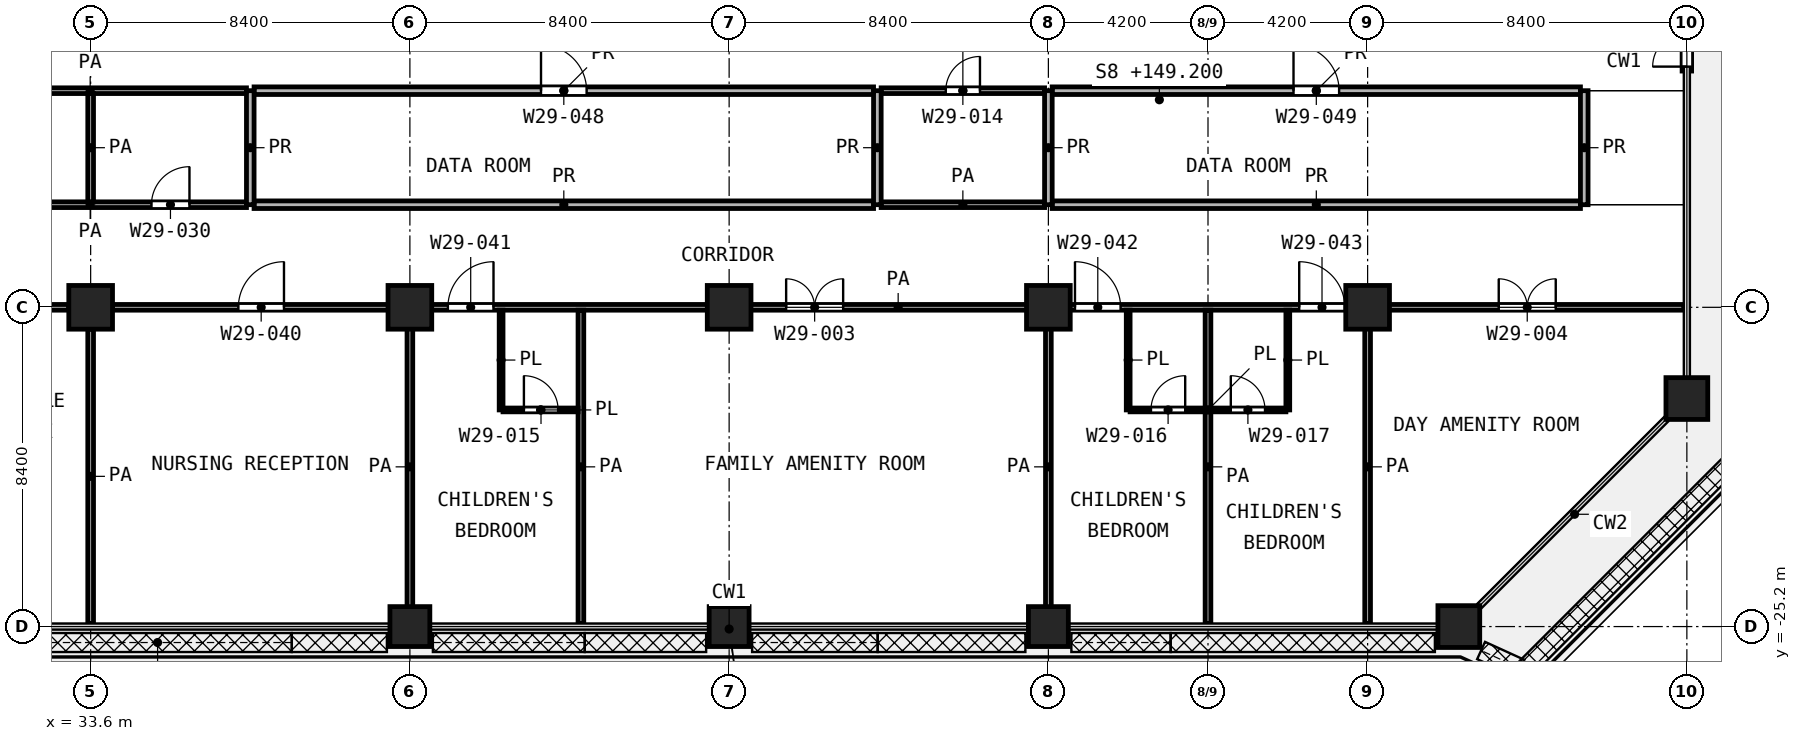
"""IFC4 building model, lengths in metres.
Left out: names, types, materials, properties, quantities, classifications, styles, units other than length and angle.
Written with IfcOpenShell. Run it as: python <this file> out.ifc"""

import sys

from ifc_helpers import new_model, si_unit, direction, frame, frame_2d, origin, origin_2d, place, context, subcontext, project, spatial, rectangle, extrude, element, fill, save


model = new_model("IFC4")
c1 = context("Model", 3, precision=1e-05, world=origin(), true_north=direction((0.0, 1.0)))
c2 = subcontext(c1, "Body", "Model", "MODEL_VIEW")
j1 = project(units=[si_unit("LENGTHUNIT", "METRE"), si_unit("PLANEANGLEUNIT", "RADIAN")], contexts=[c1])
p1 = place(None, origin())
s1 = spatial("IfcSite", under=j1, at=p1, CompositionType="ELEMENT")
p2 = place(p1, origin())
s2 = spatial("IfcBuilding", under=s1, at=p2, CompositionType="ELEMENT")
p3 = place(p2, frame((0.0, 0.0, 149.2)))
s3 = spatial("IfcBuildingStorey", under=s2, at=p3, CompositionType="ELEMENT", Elevation=149.2)
for number, where, z_axis, x_axis in (
    (1, (33.6, -16.8, 0.0), (0.0, 0.0, 1.0), (1.0, 0.0, 0.0)),
    (2, (42.0, -16.8, 0.0), (0.0, 0.0, 1.0), (1.0, 0.0, 0.0)),
    (3, (50.4, -16.8, 0.0), (0.0, 0.0, 1.0), (1.0, 0.0, 0.0)),
    (4, (58.8, -16.8, 0.0), (0.0, 0.0, 1.0), (1.0, 0.0, 0.0)),
    (5, (67.2, -16.8, 0.0), (0.0, 0.0, 1.0), (1.0, 0.0, 0.0)),
):
    element("IfcColumn", number, at=place(p3, frame(where, z_axis=z_axis, x_axis=x_axis)), inside=s3, PredefinedType="COLUMN", context=c2, shape_type="SweptSolid", body=[
        extrude(rectangle(XDim=1.15, YDim=1.15, at=origin_2d()), origin(), (0.0, 0.0, 1.0), 4.2),
    ])
p4 = place(p3, frame((75.6, -19.2, 0.0), z_axis=(0.0, 0.0, 1.0), x_axis=(1.0, 0.0, 0.0)))
e6 = element("IfcColumn", 6, at=p4, inside=s3, PredefinedType="COLUMN", context=c2, shape_type="SweptSolid", body=[
    extrude(rectangle(XDim=1.1, YDim=1.1, at=origin_2d()), origin(), (0.0, 0.0, 1.0), 4.2),
])
for number, where, z_axis, x_axis in (
    (7, (42.0, -25.2, 0.0), (0.0, 0.0, 1.0), (1.0, 0.0, 0.0)),
    (8, (50.4, -25.2, 0.0), (0.0, 0.0, 1.0), (1.0, 0.0, 0.0)),
    (9, (58.8, -25.2, 0.0), (0.0, 0.0, 1.0), (1.0, 0.0, 0.0)),
):
    element("IfcColumn", number, at=place(p3, frame(where, z_axis=z_axis, x_axis=x_axis)), inside=s3, PredefinedType="COLUMN", context=c2, shape_type="SweptSolid", body=[
        extrude(rectangle(XDim=1.05, YDim=1.05, at=origin_2d()), origin(), (0.0, 0.0, 1.0), 4.2),
    ])
p5 = place(p3, frame((69.6, -25.2, 0.0), z_axis=(0.0, 0.0, 1.0), x_axis=(1.0, 0.0, 0.0)))
e10 = element("IfcColumn", 10, at=p5, inside=s3, PredefinedType="COLUMN", context=c2, shape_type="SweptSolid", body=[
    extrude(rectangle(XDim=1.1, YDim=1.1, at=origin_2d()), origin(), (0.0, 0.0, 1.0), 4.2),
])
p6 = place(p3, frame((75.6, -10.583, 0.0), z_axis=(0.0, 0.0, 1.0), x_axis=(0.0, 1.0, 0.0)))
e11 = element("IfcWall", 11, at=p6, inside=s3, PredefinedType="SOLIDWALL", context=c2, shape_type="SweptSolid", body=[
    extrude(rectangle(XDim=4.033, YDim=0.25, at=frame_2d((2.017, 0.0))), origin(), (0.0, 0.0, 1.0), 3.58),
])
p7 = place(p6, frame((0.117, 0.0, 0.0)))
e12 = element("IfcOpeningElement", 12, at=p7, cuts=e11, PredefinedType="OPENING", context=c2, shape_type="SweptSolid", body=[
    extrude(rectangle(XDim=1.8, YDim=2.1, at=frame_2d((0.9, 1.05))), frame((0.0, 0.135, 0.0), z_axis=(0.0, -1.0, 0.0), x_axis=(1.0, 0.0, 0.0)), (0.0, 0.0, 1.0), 0.27),
])
p8 = place(p3, frame((44.45, -19.5, 0.0), z_axis=(0.0, 0.0, 1.0), x_axis=(1.0, 0.0, 0.0)))
e13 = element("IfcWall", 13, at=p8, inside=s3, PredefinedType="PARTITIONING", context=c2, shape_type="SweptSolid", body=[
    extrude(rectangle(XDim=1.975, YDim=0.1, at=frame_2d((0.988, 0.0))), origin(), (0.0, 0.0, 1.0), 3.7),
])
p9 = place(p8, frame((0.55, 0.0, 0.0)))
e14 = element("IfcOpeningElement", 14, at=p9, cuts=e13, PredefinedType="OPENING", context=c2, shape_type="SweptSolid", body=[
    extrude(rectangle(XDim=0.9, YDim=2.1, at=frame_2d((0.45, 1.05))), frame((0.0, 0.06, 0.0), z_axis=(0.0, -1.0, 0.0), x_axis=(1.0, 0.0, 0.0)), (0.0, 0.0, 1.0), 0.12),
])
p10 = place(p3, frame((60.95, -19.5, 0.0), z_axis=(0.0, 0.0, 1.0), x_axis=(1.0, 0.0, 0.0)))
e15 = element("IfcWall", 15, at=p10, inside=s3, PredefinedType="PARTITIONING", context=c2, shape_type="SweptSolid", body=[
    extrude(rectangle(XDim=4.1, YDim=0.1, at=frame_2d((2.05, 0.0))), origin(), (0.0, 0.0, 1.0), 3.7),
])
p11 = place(p10, frame((0.55, 0.0, 0.0)))
e16 = element("IfcOpeningElement", 16, at=p11, cuts=e15, PredefinedType="OPENING", context=c2, shape_type="SweptSolid", body=[
    extrude(rectangle(XDim=0.9, YDim=2.1, at=frame_2d((0.45, 1.05))), frame((0.0, 0.06, 0.0), z_axis=(0.0, -1.0, 0.0), x_axis=(1.0, 0.0, 0.0)), (0.0, 0.0, 1.0), 0.12),
])
p12 = place(p10, frame((2.65, 0.0, 0.0)))
e17 = element("IfcOpeningElement", 17, at=p12, cuts=e15, PredefinedType="OPENING", context=c2, shape_type="SweptSolid", body=[
    extrude(rectangle(XDim=0.9, YDim=2.1, at=frame_2d((0.45, 1.05))), frame((0.0, 0.06, 0.0), z_axis=(0.0, -1.0, 0.0), x_axis=(1.0, 0.0, 0.0)), (0.0, 0.0, 1.0), 0.12),
])
for number, where, z_axis, x_axis in (
    (18, (44.4, -19.5, 0.0), (0.0, 0.0, 1.0), (0.0, 1.0, 0.0)),
    (19, (60.9, -19.5, 0.0), (0.0, 0.0, 1.0), (0.0, 1.0, 0.0)),
    (20, (65.1, -19.5, 0.0), (0.0, 0.0, 1.0), (0.0, 1.0, 0.0)),
):
    element("IfcWall", number, at=place(p3, frame(where, z_axis=z_axis, x_axis=x_axis)), inside=s3, PredefinedType="PARTITIONING", context=c2, shape_type="SweptSolid", body=[
        extrude(rectangle(XDim=2.625, YDim=0.1, at=frame_2d((1.312, 0.0))), origin(), (0.0, 0.0, 1.0), 3.7),
    ])
p13 = place(p3, frame((25.0, -16.8, 0.0), z_axis=(0.0, 0.0, 1.0), x_axis=(1.0, 0.0, 0.0)))
e21 = element("IfcWall", 21, at=p13, inside=s3, PredefinedType="PARTITIONING", context=c2, shape_type="SweptSolid", body=[
    extrude(rectangle(XDim=8.025, YDim=0.15, at=frame_2d((4.012, 0.0))), origin(), (0.0, 0.0, 1.0), 3.7),
])
p14 = place(p13, frame((1.55, 0.0, 0.0)))
e22 = element("IfcOpeningElement", 22, at=p14, cuts=e21, PredefinedType="OPENING", context=c2, shape_type="SweptSolid", body=[
    extrude(rectangle(XDim=1.5, YDim=2.1, at=frame_2d((0.75, 1.05))), frame((0.0, 0.085, 0.0), z_axis=(0.0, -1.0, 0.0), x_axis=(1.0, 0.0, 0.0)), (0.0, 0.0, 1.0), 0.17),
])
p15 = place(p13, frame((5.712, 0.0, 0.0)))
e23 = element("IfcOpeningElement", 23, at=p15, cuts=e21, PredefinedType="OPENING", context=c2, shape_type="SweptSolid", body=[
    extrude(rectangle(XDim=1.0, YDim=2.1, at=frame_2d((0.5, 1.05))), frame((0.0, 0.085, 0.0), z_axis=(0.0, -1.0, 0.0), x_axis=(1.0, 0.0, 0.0)), (0.0, 0.0, 1.0), 0.17),
])
p16 = place(p3, frame((34.175, -16.8, 0.0), z_axis=(0.0, 0.0, 1.0), x_axis=(1.0, 0.0, 0.0)))
e24 = element("IfcWall", 24, at=p16, inside=s3, PredefinedType="PARTITIONING", context=c2, shape_type="SweptSolid", body=[
    extrude(rectangle(XDim=41.345, YDim=0.15, at=frame_2d((20.672, 0.0))), origin(), (0.0, 0.0, 1.0), 3.7),
])
p17 = place(p16, frame((3.312, 0.0, 0.0)))
e25 = element("IfcOpeningElement", 25, at=p17, cuts=e24, PredefinedType="OPENING", context=c2, shape_type="SweptSolid", body=[
    extrude(rectangle(XDim=1.2, YDim=2.1, at=frame_2d((0.6, 1.05))), frame((0.0, 0.085, 0.0), z_axis=(0.0, -1.0, 0.0), x_axis=(1.0, 0.0, 0.0)), (0.0, 0.0, 1.0), 0.17),
])
p18 = place(p16, frame((8.825, 0.0, 0.0)))
e26 = element("IfcOpeningElement", 26, at=p18, cuts=e24, PredefinedType="OPENING", context=c2, shape_type="SweptSolid", body=[
    extrude(rectangle(XDim=1.2, YDim=2.1, at=frame_2d((0.6, 1.05))), frame((0.0, 0.085, 0.0), z_axis=(0.0, -1.0, 0.0), x_axis=(1.0, 0.0, 0.0)), (0.0, 0.0, 1.0), 0.17),
])
p19 = place(p16, frame((17.725, 0.0, 0.0)))
e27 = element("IfcOpeningElement", 27, at=p19, cuts=e24, PredefinedType="OPENING", context=c2, shape_type="SweptSolid", body=[
    extrude(rectangle(XDim=1.5, YDim=2.1, at=frame_2d((0.75, 1.05))), frame((0.0, 0.085, 0.0), z_axis=(0.0, -1.0, 0.0), x_axis=(1.0, 0.0, 0.0)), (0.0, 0.0, 1.0), 0.17),
])
p20 = place(p16, frame((25.325, 0.0, 0.0)))
e28 = element("IfcOpeningElement", 28, at=p20, cuts=e24, PredefinedType="OPENING", context=c2, shape_type="SweptSolid", body=[
    extrude(rectangle(XDim=1.2, YDim=2.1, at=frame_2d((0.6, 1.05))), frame((0.0, 0.085, 0.0), z_axis=(0.0, -1.0, 0.0), x_axis=(1.0, 0.0, 0.0)), (0.0, 0.0, 1.0), 0.17),
])
p21 = place(p16, frame((31.225, 0.0, 0.0)))
e29 = element("IfcOpeningElement", 29, at=p21, cuts=e24, PredefinedType="OPENING", context=c2, shape_type="SweptSolid", body=[
    extrude(rectangle(XDim=1.2, YDim=2.1, at=frame_2d((0.6, 1.05))), frame((0.0, 0.085, 0.0), z_axis=(0.0, -1.0, 0.0), x_axis=(1.0, 0.0, 0.0)), (0.0, 0.0, 1.0), 0.17),
])
p22 = place(p16, frame((36.475, 0.0, 0.0)))
e30 = element("IfcOpeningElement", 30, at=p22, cuts=e24, PredefinedType="OPENING", context=c2, shape_type="SweptSolid", body=[
    extrude(rectangle(XDim=1.5, YDim=2.1, at=frame_2d((0.75, 1.05))), frame((0.0, 0.085, 0.0), z_axis=(0.0, -1.0, 0.0), x_axis=(1.0, 0.0, 0.0)), (0.0, 0.0, 1.0), 0.17),
])
p23 = place(p3, frame((29.475, -14.1, 0.0), z_axis=(0.0, 0.0, 1.0), x_axis=(1.0, 0.0, 0.0)))
e31 = element("IfcWall", 31, at=p23, inside=s3, PredefinedType="PARTITIONING", context=c2, shape_type="SweptSolid", body=[
    extrude(rectangle(XDim=8.225, YDim=0.15, at=frame_2d((4.112, 0.0))), origin(), (0.0, 0.0, 1.0), 3.7),
])
p24 = place(p23, frame((5.725, 0.0, 0.0)))
e32 = element("IfcOpeningElement", 32, at=p24, cuts=e31, PredefinedType="OPENING", context=c2, shape_type="SweptSolid", body=[
    extrude(rectangle(XDim=1.0, YDim=2.1, at=frame_2d((0.5, 1.05))), frame((0.0, 0.085, 0.0), z_axis=(0.0, -1.0, 0.0), x_axis=(1.0, 0.0, 0.0)), (0.0, 0.0, 1.0), 0.17),
])
p25 = place(p3, frame((54.4, -14.1, 0.0), z_axis=(0.0, 0.0, 1.0), x_axis=(1.0, 0.0, 0.0)))
e33 = element("IfcWall", 33, at=p25, inside=s3, PredefinedType="PARTITIONING", context=c2, shape_type="SweptSolid", body=[
    extrude(rectangle(XDim=4.3, YDim=0.15, at=frame_2d((2.15, 0.0))), origin(), (0.0, 0.0, 1.0), 3.7),
])
p26 = place(p3, frame((29.475, -11.1, 0.0), z_axis=(0.0, 0.0, 1.0), x_axis=(1.0, 0.0, 0.0)))
e34 = element("IfcWall", 34, at=p26, inside=s3, PredefinedType="PARTITIONING", context=c2, shape_type="SweptSolid", body=[
    extrude(rectangle(XDim=8.225, YDim=0.15, at=frame_2d((4.112, 0.0))), origin(), (0.0, 0.0, 1.0), 3.7),
])
p27 = place(p26, frame((1.525, 0.0, 0.0)))
e35 = element("IfcOpeningElement", 35, at=p27, cuts=e34, PredefinedType="OPENING", context=c2, shape_type="SweptSolid", body=[
    extrude(rectangle(XDim=1.0, YDim=2.1, at=frame_2d((0.5, 1.05))), frame((0.0, 0.085, 0.0), z_axis=(0.0, -1.0, 0.0), x_axis=(1.0, 0.0, 0.0)), (0.0, 0.0, 1.0), 0.17),
])
p28 = place(p3, frame((54.4, -11.1, 0.0), z_axis=(0.0, 0.0, 1.0), x_axis=(1.0, 0.0, 0.0)))
e36 = element("IfcWall", 36, at=p28, inside=s3, PredefinedType="PARTITIONING", context=c2, shape_type="SweptSolid", body=[
    extrude(rectangle(XDim=4.3, YDim=0.15, at=frame_2d((2.15, 0.0))), origin(), (0.0, 0.0, 1.0), 3.7),
])
p29 = place(p28, frame((1.7, 0.0, 0.0)))
e37 = element("IfcOpeningElement", 37, at=p29, cuts=e36, PredefinedType="OPENING", context=c2, shape_type="SweptSolid", body=[
    extrude(rectangle(XDim=0.9, YDim=2.1, at=frame_2d((0.45, 1.05))), frame((0.0, 0.085, 0.0), z_axis=(0.0, -1.0, 0.0), x_axis=(1.0, 0.0, 0.0)), (0.0, 0.0, 1.0), 0.17),
])
p30 = place(p3, frame((33.6, -25.12, 0.0), z_axis=(0.0, 0.0, 1.0), x_axis=(0.0, 1.0, 0.0)))
e38 = element("IfcWall", 38, at=p30, inside=s3, PredefinedType="PARTITIONING", context=c2, shape_type="SweptSolid", body=[
    extrude(rectangle(XDim=7.745, YDim=0.15, at=frame_2d((3.873, 0.0))), origin(), (0.0, 0.0, 1.0), 3.7),
])
p31 = place(p3, frame((33.6, -14.025, 0.0), z_axis=(0.0, 0.0, 1.0), x_axis=(0.0, 1.0, 0.0)))
e39 = element("IfcWall", 39, at=p31, inside=s3, PredefinedType="PARTITIONING", context=c2, shape_type="SweptSolid", body=[
    extrude(rectangle(XDim=2.85, YDim=0.15, at=frame_2d((1.425, 0.0))), origin(), (0.0, 0.0, 1.0), 3.7),
])
for number, where, z_axis, x_axis in (
    (40, (42.0, -25.12, 0.0), (0.0, 0.0, 1.0), (0.0, 1.0, 0.0)),
    (41, (46.5, -25.12, 0.0), (0.0, 0.0, 1.0), (0.0, 1.0, 0.0)),
    (42, (58.8, -25.12, 0.0), (0.0, 0.0, 1.0), (0.0, 1.0, 0.0)),
    (43, (63.0, -25.12, 0.0), (0.0, 0.0, 1.0), (0.0, 1.0, 0.0)),
    (44, (67.2, -25.12, 0.0), (0.0, 0.0, 1.0), (0.0, 1.0, 0.0)),
):
    element("IfcWall", number, at=place(p3, frame(where, z_axis=z_axis, x_axis=x_axis)), inside=s3, PredefinedType="PARTITIONING", context=c2, shape_type="SweptSolid", body=[
        extrude(rectangle(XDim=8.245, YDim=0.15, at=frame_2d((4.123, 0.0))), origin(), (0.0, 0.0, 1.0), 3.7),
    ])
p32 = place(p3, frame((37.9, -14.1, 0.0), z_axis=(0.0, 0.0, 1.0), x_axis=(1.0, 0.0, 0.0)))
e45 = element("IfcWall", 45, at=p32, inside=s3, PredefinedType="PARTITIONING", context=c2, shape_type="SweptSolid", body=[
    extrude(rectangle(XDim=16.3, YDim=0.2, at=frame_2d((8.15, 0.0))), origin(), (0.0, 0.0, 1.0), 3.7),
])
p33 = place(p3, frame((58.9, -14.1, 0.0), z_axis=(0.0, 0.0, 1.0), x_axis=(1.0, 0.0, 0.0)))
e46 = element("IfcWall", 46, at=p33, inside=s3, PredefinedType="PARTITIONING", context=c2, shape_type="SweptSolid", body=[
    extrude(rectangle(XDim=13.9, YDim=0.2, at=frame_2d((6.95, 0.0))), origin(), (0.0, 0.0, 1.0), 3.7),
])
p34 = place(p3, frame((37.9, -11.1, 0.0), z_axis=(0.0, 0.0, 1.0), x_axis=(1.0, 0.0, 0.0)))
e47 = element("IfcWall", 47, at=p34, inside=s3, PredefinedType="PARTITIONING", context=c2, shape_type="SweptSolid", body=[
    extrude(rectangle(XDim=16.3, YDim=0.2, at=frame_2d((8.15, 0.0))), origin(), (0.0, 0.0, 1.0), 3.7),
])
p35 = place(p34, frame((7.55, 0.0, 0.0)))
e48 = element("IfcOpeningElement", 48, at=p35, cuts=e47, PredefinedType="OPENING", context=c2, shape_type="SweptSolid", body=[
    extrude(rectangle(XDim=1.2, YDim=2.1, at=frame_2d((0.6, 1.05))), frame((0.0, 0.11, 0.0), z_axis=(0.0, -1.0, 0.0), x_axis=(1.0, 0.0, 0.0)), (0.0, 0.0, 1.0), 0.22),
])
p36 = place(p3, frame((58.9, -11.1, 0.0), z_axis=(0.0, 0.0, 1.0), x_axis=(1.0, 0.0, 0.0)))
e49 = element("IfcWall", 49, at=p36, inside=s3, PredefinedType="PARTITIONING", context=c2, shape_type="SweptSolid", body=[
    extrude(rectangle(XDim=13.9, YDim=0.2, at=frame_2d((6.95, 0.0))), origin(), (0.0, 0.0, 1.0), 3.7),
])
p37 = place(p36, frame((6.35, 0.0, 0.0)))
e50 = element("IfcOpeningElement", 50, at=p37, cuts=e49, PredefinedType="OPENING", context=c2, shape_type="SweptSolid", body=[
    extrude(rectangle(XDim=1.2, YDim=2.1, at=frame_2d((0.6, 1.05))), frame((0.0, 0.11, 0.0), z_axis=(0.0, -1.0, 0.0), x_axis=(1.0, 0.0, 0.0)), (0.0, 0.0, 1.0), 0.22),
])
for number, where, z_axis, x_axis in (
    (51, (37.8, -14.1, 0.0), (0.0, 0.0, 1.0), (0.0, 1.0, 0.0)),
    (52, (54.3, -14.1, 0.0), (0.0, 0.0, 1.0), (0.0, 1.0, 0.0)),
    (53, (58.8, -14.1, 0.0), (0.0, 0.0, 1.0), (0.0, 1.0, 0.0)),
    (54, (72.9, -14.1, 0.0), (0.0, 0.0, 1.0), (0.0, 1.0, 0.0)),
):
    element("IfcWall", number, at=place(p3, frame(where, z_axis=z_axis, x_axis=x_axis)), inside=s3, PredefinedType="PARTITIONING", context=c2, shape_type="SweptSolid", body=[
        extrude(rectangle(XDim=3.0, YDim=0.2, at=frame_2d((1.5, 0.0))), origin(), (0.0, 0.0, 1.0), 3.7),
    ])
p38 = place(p7, origin())
e55 = element("IfcDoor", 55, at=p38, inside=s3, OperationType="DOUBLE_DOOR_SINGLE_SWING", PredefinedType="DOOR", context=c2, shape_type="SweptSolid", body=[
    extrude(rectangle(XDim=1.8, YDim=2.1, at=frame_2d((0.9, 1.05))), frame((0.0, 0.025, 0.0), z_axis=(0.0, -1.0, 0.0), x_axis=(1.0, 0.0, 0.0)), (0.0, 0.0, 1.0), 0.05),
])
fill(e12, e55)
p39 = place(p24, origin())
e56 = element("IfcDoor", 56, at=p39, inside=s3, OperationType="SINGLE_SWING_RIGHT", PredefinedType="DOOR", context=c2, shape_type="SweptSolid", body=[
    extrude(rectangle(XDim=1.0, YDim=2.1, at=frame_2d((0.5, 1.05))), frame((0.0, 0.025, 0.0), z_axis=(0.0, -1.0, 0.0), x_axis=(1.0, 0.0, 0.0)), (0.0, 0.0, 1.0), 0.05),
])
fill(e32, e56)
p40 = place(p35, origin())
e57 = element("IfcDoor", 57, at=p40, inside=s3, OperationType="SINGLE_SWING_LEFT", PredefinedType="DOOR", context=c2, shape_type="SweptSolid", body=[
    extrude(rectangle(XDim=1.2, YDim=2.1, at=frame_2d((0.6, 1.05))), frame((0.0, 0.025, 0.0), z_axis=(0.0, -1.0, 0.0), x_axis=(1.0, 0.0, 0.0)), (0.0, 0.0, 1.0), 0.05),
])
fill(e48, e57)
p41 = place(p29, origin())
e58 = element("IfcDoor", 58, at=p41, inside=s3, OperationType="SINGLE_SWING_RIGHT", PredefinedType="DOOR", context=c2, shape_type="SweptSolid", body=[
    extrude(rectangle(XDim=0.9, YDim=2.1, at=frame_2d((0.45, 1.05))), frame((0.0, 0.025, 0.0), z_axis=(0.0, -1.0, 0.0), x_axis=(1.0, 0.0, 0.0)), (0.0, 0.0, 1.0), 0.05),
])
fill(e37, e58)
p42 = place(p37, origin())
e59 = element("IfcDoor", 59, at=p42, inside=s3, OperationType="SINGLE_SWING_LEFT", PredefinedType="DOOR", context=c2, shape_type="SweptSolid", body=[
    extrude(rectangle(XDim=1.2, YDim=2.1, at=frame_2d((0.6, 1.05))), frame((0.0, 0.025, 0.0), z_axis=(0.0, -1.0, 0.0), x_axis=(1.0, 0.0, 0.0)), (0.0, 0.0, 1.0), 0.05),
])
fill(e50, e59)
p43 = place(p17, origin())
e60 = element("IfcDoor", 60, at=p43, inside=s3, OperationType="SINGLE_SWING_RIGHT", PredefinedType="DOOR", context=c2, shape_type="SweptSolid", body=[
    extrude(rectangle(XDim=1.2, YDim=2.1, at=frame_2d((0.6, 1.05))), frame((0.0, 0.025, 0.0), z_axis=(0.0, -1.0, 0.0), x_axis=(1.0, 0.0, 0.0)), (0.0, 0.0, 1.0), 0.05),
])
fill(e25, e60)
p44 = place(p18, origin())
e61 = element("IfcDoor", 61, at=p44, inside=s3, OperationType="SINGLE_SWING_RIGHT", PredefinedType="DOOR", context=c2, shape_type="SweptSolid", body=[
    extrude(rectangle(XDim=1.2, YDim=2.1, at=frame_2d((0.6, 1.05))), frame((0.0, 0.025, 0.0), z_axis=(0.0, -1.0, 0.0), x_axis=(1.0, 0.0, 0.0)), (0.0, 0.0, 1.0), 0.05),
])
fill(e26, e61)
p45 = place(p9, origin())
e62 = element("IfcDoor", 62, at=p45, inside=s3, OperationType="SINGLE_SWING_LEFT", PredefinedType="DOOR", context=c2, shape_type="SweptSolid", body=[
    extrude(rectangle(XDim=0.9, YDim=2.1, at=frame_2d((0.45, 1.05))), frame((0.0, 0.025, 0.0), z_axis=(0.0, -1.0, 0.0), x_axis=(1.0, 0.0, 0.0)), (0.0, 0.0, 1.0), 0.05),
])
fill(e14, e62)
p46 = place(p19, origin())
e63 = element("IfcDoor", 63, at=p46, inside=s3, OperationType="DOUBLE_DOOR_SINGLE_SWING", PredefinedType="DOOR", context=c2, shape_type="SweptSolid", body=[
    extrude(rectangle(XDim=1.5, YDim=2.1, at=frame_2d((0.75, 1.05))), frame((0.0, 0.025, 0.0), z_axis=(0.0, -1.0, 0.0), x_axis=(1.0, 0.0, 0.0)), (0.0, 0.0, 1.0), 0.05),
])
fill(e27, e63)
p47 = place(p20, origin())
e64 = element("IfcDoor", 64, at=p47, inside=s3, OperationType="SINGLE_SWING_LEFT", PredefinedType="DOOR", context=c2, shape_type="SweptSolid", body=[
    extrude(rectangle(XDim=1.2, YDim=2.1, at=frame_2d((0.6, 1.05))), frame((0.0, 0.025, 0.0), z_axis=(0.0, -1.0, 0.0), x_axis=(1.0, 0.0, 0.0)), (0.0, 0.0, 1.0), 0.05),
])
fill(e28, e64)
p48 = place(p11, origin())
e65 = element("IfcDoor", 65, at=p48, inside=s3, OperationType="SINGLE_SWING_RIGHT", PredefinedType="DOOR", context=c2, shape_type="SweptSolid", body=[
    extrude(rectangle(XDim=0.9, YDim=2.1, at=frame_2d((0.45, 1.05))), frame((0.0, 0.025, 0.0), z_axis=(0.0, -1.0, 0.0), x_axis=(1.0, 0.0, 0.0)), (0.0, 0.0, 1.0), 0.05),
])
fill(e16, e65)
p49 = place(p21, origin())
e66 = element("IfcDoor", 66, at=p49, inside=s3, OperationType="SINGLE_SWING_LEFT", PredefinedType="DOOR", context=c2, shape_type="SweptSolid", body=[
    extrude(rectangle(XDim=1.2, YDim=2.1, at=frame_2d((0.6, 1.05))), frame((0.0, 0.025, 0.0), z_axis=(0.0, -1.0, 0.0), x_axis=(1.0, 0.0, 0.0)), (0.0, 0.0, 1.0), 0.05),
])
fill(e29, e66)
p50 = place(p12, origin())
e67 = element("IfcDoor", 67, at=p50, inside=s3, OperationType="SINGLE_SWING_LEFT", PredefinedType="DOOR", context=c2, shape_type="SweptSolid", body=[
    extrude(rectangle(XDim=0.9, YDim=2.1, at=frame_2d((0.45, 1.05))), frame((0.0, 0.025, 0.0), z_axis=(0.0, -1.0, 0.0), x_axis=(1.0, 0.0, 0.0)), (0.0, 0.0, 1.0), 0.05),
])
fill(e17, e67)
p51 = place(p22, origin())
e68 = element("IfcDoor", 68, at=p51, inside=s3, OperationType="DOUBLE_DOOR_SINGLE_SWING", PredefinedType="DOOR", context=c2, shape_type="SweptSolid", body=[
    extrude(rectangle(XDim=1.5, YDim=2.1, at=frame_2d((0.75, 1.05))), frame((0.0, 0.025, 0.0), z_axis=(0.0, -1.0, 0.0), x_axis=(1.0, 0.0, 0.0)), (0.0, 0.0, 1.0), 0.05),
])
fill(e30, e68)
save(model, sys.argv[1])
